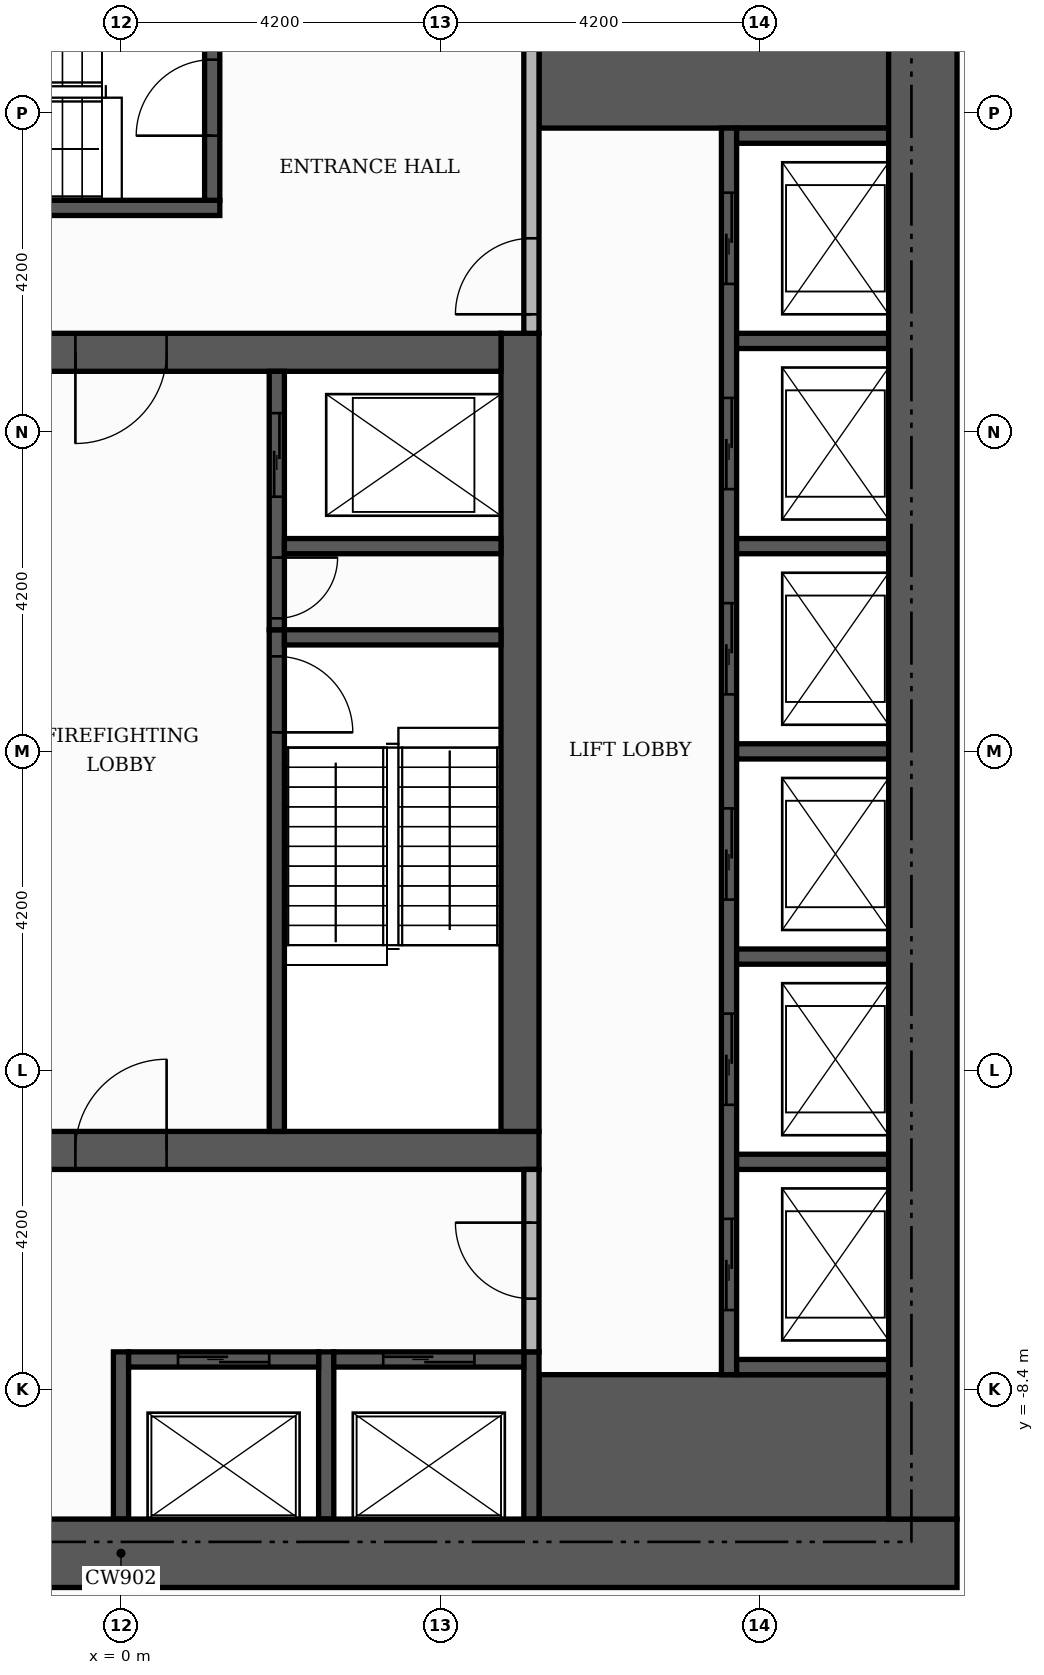
"""IFC4 building model, lengths in metres.
Left out: names, types, materials, properties, quantities, classifications, styles, units other than length and angle.
Written with IfcOpenShell. Run it as: python <this file> out.ifc"""

import sys

from ifc_helpers import new_model, si_unit, direction, frame, frame_2d, origin, place, context, subcontext, project, spatial, rectangle, extrude, element, fill, save


model = new_model("IFC4")
c1 = context("Model", 3, precision=1e-05, world=origin(), true_north=direction((0.0, 1.0)))
c2 = subcontext(c1, "Body", "Model", "MODEL_VIEW")
j1 = project(units=[si_unit("LENGTHUNIT", "METRE"), si_unit("PLANEANGLEUNIT", "RADIAN")], contexts=[c1])
p1 = place(None, origin())
s1 = spatial("IfcSite", under=j1, at=p1, CompositionType="ELEMENT")
p2 = place(p1, origin())
s2 = spatial("IfcBuilding", under=s1, at=p2, CompositionType="ELEMENT")
p3 = place(p2, frame((0.0, 0.0, 126.0)))
s3 = spatial("IfcBuildingStorey", under=s2, at=p3, CompositionType="ELEMENT", Elevation=126.0)
p4 = place(p3, frame((-5.5, -5.25, 0.0), z_axis=(0.0, 0.0, 1.0), x_axis=(1.0, 0.0, 0.0)))
e1 = element("IfcWall", 1, at=p4, inside=s3, PredefinedType="SHEAR", context=c2, shape_type="SweptSolid", body=[
    extrude(rectangle(XDim=11.0, YDim=0.5, at=frame_2d((5.5, 0.0))), origin(), (0.0, 0.0, 1.0), 7.38),
])
p5 = place(p4, frame((4.9, 0.0, 0.0)))
e2 = element("IfcOpeningElement", 2, at=p5, cuts=e1, PredefinedType="OPENING", context=c2, shape_type="SweptSolid", body=[
    extrude(rectangle(XDim=1.2, YDim=2.1, at=frame_2d((0.6, 1.05))), frame((0.0, 0.26, 0.0), z_axis=(0.0, -1.0, 0.0), x_axis=(1.0, 0.0, 0.0)), (0.0, 0.0, 1.0), 0.52),
])
p6 = place(p3, frame((5.25, -5.0, 0.0), z_axis=(0.0, 0.0, 1.0), x_axis=(0.0, 1.0, 0.0)))
e3 = element("IfcWall", 3, at=p6, inside=s3, PredefinedType="SHEAR", context=c2, shape_type="SweptSolid", body=[
    extrude(rectangle(XDim=10.5, YDim=0.5, at=frame_2d((5.25, 0.0))), origin(), (0.0, 0.0, 1.0), 7.38),
])
p7 = place(p3, frame((-5.0, 5.25, 0.0), z_axis=(0.0, 0.0, 1.0), x_axis=(1.0, 0.0, 0.0)))
e4 = element("IfcWall", 4, at=p7, inside=s3, PredefinedType="SHEAR", context=c2, shape_type="SweptSolid", body=[
    extrude(rectangle(XDim=10.0, YDim=0.5, at=frame_2d((5.0, 0.0))), origin(), (0.0, 0.0, 1.0), 7.38),
])
p8 = place(p7, frame((4.4, 0.0, 0.0)))
e5 = element("IfcOpeningElement", 5, at=p8, cuts=e4, PredefinedType="OPENING", context=c2, shape_type="SweptSolid", body=[
    extrude(rectangle(XDim=1.2, YDim=2.1, at=frame_2d((0.6, 1.05))), frame((0.0, 0.26, 0.0), z_axis=(0.0, -1.0, 0.0), x_axis=(1.0, 0.0, 0.0)), (0.0, 0.0, 1.0), 0.52),
])
for number, where, z_axis, x_axis in (
    (6, (5.5, -9.15, 0.0), (0.0, 0.0, 1.0), (1.0, 0.0, 0.0)),
    (7, (5.5, 9.15, 0.0), (0.0, 0.0, 1.0), (1.0, 0.0, 0.0)),
):
    element("IfcWall", number, at=place(p3, frame(where, z_axis=z_axis, x_axis=x_axis)), inside=s3, PredefinedType="SHEAR", context=c2, shape_type="SweptSolid", body=[
        extrude(rectangle(XDim=4.6, YDim=1.9, at=frame_2d((2.3, 0.0))), origin(), (0.0, 0.0, 1.0), 7.38),
    ])
p9 = place(p3, frame((2.05, -5.0, 0.0), z_axis=(0.0, 0.0, 1.0), x_axis=(0.0, 1.0, 0.0)))
e8 = element("IfcWall", 8, at=p9, inside=s3, PredefinedType="SHEAR", context=c2, shape_type="SweptSolid", body=[
    extrude(rectangle(XDim=6.6, YDim=0.2, at=frame_2d((3.3, 0.0))), origin(), (0.0, 0.0, 1.0), 7.38),
])
p10 = place(p9, frame((5.25, 0.0, 0.0)))
e9 = element("IfcOpeningElement", 9, at=p10, cuts=e8, PredefinedType="OPENING", context=c2, shape_type="SweptSolid", body=[
    extrude(rectangle(XDim=1.0, YDim=2.1, at=frame_2d((0.5, 1.05))), frame((0.0, 0.11, 0.0), z_axis=(0.0, -1.0, 0.0), x_axis=(1.0, 0.0, 0.0)), (0.0, 0.0, 1.0), 0.22),
])
p11 = place(p3, frame((2.15, 1.5, 0.0), z_axis=(0.0, 0.0, 1.0), x_axis=(1.0, 0.0, 0.0)))
e10 = element("IfcWall", 10, at=p11, inside=s3, PredefinedType="SHEAR", context=c2, shape_type="SweptSolid", body=[
    extrude(rectangle(XDim=2.85, YDim=0.2, at=frame_2d((1.425, 0.0))), origin(), (0.0, 0.0, 1.0), 7.38),
])
p12 = place(p3, frame((-5.5, 7.15, 0.0), z_axis=(0.0, 0.0, 1.0), x_axis=(1.0, 0.0, 0.0)))
e11 = element("IfcWall", 11, at=p12, inside=s3, PredefinedType="SHEAR", context=c2, shape_type="SweptSolid", body=[
    extrude(rectangle(XDim=6.8, YDim=0.2, at=frame_2d((3.4, 0.0))), origin(), (0.0, 0.0, 1.0), 7.38),
])
p13 = place(p3, frame((1.2, 7.25, 0.0), z_axis=(0.0, 0.0, 1.0), x_axis=(0.0, 1.0, 0.0)))
e12 = element("IfcWall", 12, at=p13, inside=s3, PredefinedType="SHEAR", context=c2, shape_type="SweptSolid", body=[
    extrude(rectangle(XDim=2.85, YDim=0.2, at=frame_2d((1.425, 0.0))), origin(), (0.0, 0.0, 1.0), 7.38),
])
p14 = place(p13, frame((0.85, 0.0, 0.0)))
e13 = element("IfcOpeningElement", 13, at=p14, cuts=e12, PredefinedType="OPENING", context=c2, shape_type="SweptSolid", body=[
    extrude(rectangle(XDim=1.0, YDim=2.1, at=frame_2d((0.5, 1.05))), frame((0.0, 0.11, 0.0), z_axis=(0.0, -1.0, 0.0), x_axis=(1.0, 0.0, 0.0)), (0.0, 0.0, 1.0), 0.22),
])
for number, where, z_axis, x_axis in (
    (14, (0.0, -10.1, 0.0), (0.0, 0.0, 1.0), (0.0, 1.0, 0.0)),
    (15, (2.7, -10.1, 0.0), (0.0, 0.0, 1.0), (0.0, 1.0, 0.0)),
    (16, (5.4, -10.1, 0.0), (0.0, 0.0, 1.0), (0.0, 1.0, 0.0)),
):
    element("IfcWall", number, at=place(p3, frame(where, z_axis=z_axis, x_axis=x_axis)), inside=s3, PredefinedType="SHEAR", context=c2, shape_type="SweptSolid", body=[
        extrude(rectangle(XDim=2.2, YDim=0.2, at=frame_2d((1.1, 0.0))), origin(), (0.0, 0.0, 1.0), 7.38),
    ])
p15 = place(p3, frame((8.0, -8.2, 0.0), z_axis=(0.0, 0.0, 1.0), x_axis=(0.0, 1.0, 0.0)))
e17 = element("IfcWall", 17, at=p15, inside=s3, PredefinedType="SHEAR", context=c2, shape_type="SweptSolid", body=[
    extrude(rectangle(XDim=16.4, YDim=0.2, at=frame_2d((8.2, 0.0))), origin(), (0.0, 0.0, 1.0), 7.38),
])
p16 = place(p15, frame((0.85, 0.0, 0.0)))
e18 = element("IfcOpeningElement", 18, at=p16, cuts=e17, PredefinedType="OPENING", context=c2, shape_type="SweptSolid", body=[
    extrude(rectangle(XDim=1.2, YDim=2.1, at=frame_2d((0.6, 1.05))), frame((0.0, 0.11, 0.0), z_axis=(0.0, -1.0, 0.0), x_axis=(1.0, 0.0, 0.0)), (0.0, 0.0, 1.0), 0.22),
])
p17 = place(p15, frame((3.55, 0.0, 0.0)))
e19 = element("IfcOpeningElement", 19, at=p17, cuts=e17, PredefinedType="OPENING", context=c2, shape_type="SweptSolid", body=[
    extrude(rectangle(XDim=1.2, YDim=2.1, at=frame_2d((0.6, 1.05))), frame((0.0, 0.11, 0.0), z_axis=(0.0, -1.0, 0.0), x_axis=(1.0, 0.0, 0.0)), (0.0, 0.0, 1.0), 0.22),
])
p18 = place(p15, frame((6.25, 0.0, 0.0)))
e20 = element("IfcOpeningElement", 20, at=p18, cuts=e17, PredefinedType="OPENING", context=c2, shape_type="SweptSolid", body=[
    extrude(rectangle(XDim=1.2, YDim=2.1, at=frame_2d((0.6, 1.05))), frame((0.0, 0.11, 0.0), z_axis=(0.0, -1.0, 0.0), x_axis=(1.0, 0.0, 0.0)), (0.0, 0.0, 1.0), 0.22),
])
p19 = place(p15, frame((8.95, 0.0, 0.0)))
e21 = element("IfcOpeningElement", 21, at=p19, cuts=e17, PredefinedType="OPENING", context=c2, shape_type="SweptSolid", body=[
    extrude(rectangle(XDim=1.2, YDim=2.1, at=frame_2d((0.6, 1.05))), frame((0.0, 0.11, 0.0), z_axis=(0.0, -1.0, 0.0), x_axis=(1.0, 0.0, 0.0)), (0.0, 0.0, 1.0), 0.22),
])
p20 = place(p15, frame((11.65, 0.0, 0.0)))
e22 = element("IfcOpeningElement", 22, at=p20, cuts=e17, PredefinedType="OPENING", context=c2, shape_type="SweptSolid", body=[
    extrude(rectangle(XDim=1.2, YDim=2.1, at=frame_2d((0.6, 1.05))), frame((0.0, 0.11, 0.0), z_axis=(0.0, -1.0, 0.0), x_axis=(1.0, 0.0, 0.0)), (0.0, 0.0, 1.0), 0.22),
])
p21 = place(p15, frame((14.35, 0.0, 0.0)))
e23 = element("IfcOpeningElement", 23, at=p21, cuts=e17, PredefinedType="OPENING", context=c2, shape_type="SweptSolid", body=[
    extrude(rectangle(XDim=1.2, YDim=2.1, at=frame_2d((0.6, 1.05))), frame((0.0, 0.11, 0.0), z_axis=(0.0, -1.0, 0.0), x_axis=(1.0, 0.0, 0.0)), (0.0, 0.0, 1.0), 0.22),
])
p22 = place(p3, frame((8.1, -8.1, 0.0), z_axis=(0.0, 0.0, 1.0), x_axis=(1.0, 0.0, 0.0)))
e24 = element("IfcWall", 24, at=p22, inside=s3, PredefinedType="SHEAR", context=c2, shape_type="SweptSolid", body=[
    extrude(rectangle(XDim=2.0, YDim=0.2, at=frame_2d((1.0, 0.0))), origin(), (0.0, 0.0, 1.0), 7.38),
])
p23 = place(p3, frame((0.1, -8.0, 0.0), z_axis=(0.0, 0.0, 1.0), x_axis=(1.0, 0.0, 0.0)))
e25 = element("IfcWall", 25, at=p23, inside=s3, PredefinedType="SHEAR", context=c2, shape_type="SweptSolid", body=[
    extrude(rectangle(XDim=2.5, YDim=0.2, at=frame_2d((1.25, 0.0))), origin(), (0.0, 0.0, 1.0), 7.38),
])
p24 = place(p23, frame((0.65, 0.0, 0.0)))
e26 = element("IfcOpeningElement", 26, at=p24, cuts=e25, PredefinedType="OPENING", context=c2, shape_type="SweptSolid", body=[
    extrude(rectangle(XDim=1.2, YDim=2.1, at=frame_2d((0.6, 1.05))), frame((0.0, 0.11, 0.0), z_axis=(0.0, -1.0, 0.0), x_axis=(1.0, 0.0, 0.0)), (0.0, 0.0, 1.0), 0.22),
])
p25 = place(p3, frame((2.8, -8.0, 0.0), z_axis=(0.0, 0.0, 1.0), x_axis=(1.0, 0.0, 0.0)))
e27 = element("IfcWall", 27, at=p25, inside=s3, PredefinedType="SHEAR", context=c2, shape_type="SweptSolid", body=[
    extrude(rectangle(XDim=2.5, YDim=0.2, at=frame_2d((1.25, 0.0))), origin(), (0.0, 0.0, 1.0), 7.38),
])
p26 = place(p25, frame((0.65, 0.0, 0.0)))
e28 = element("IfcOpeningElement", 28, at=p26, cuts=e27, PredefinedType="OPENING", context=c2, shape_type="SweptSolid", body=[
    extrude(rectangle(XDim=1.2, YDim=2.1, at=frame_2d((0.6, 1.05))), frame((0.0, 0.11, 0.0), z_axis=(0.0, -1.0, 0.0), x_axis=(1.0, 0.0, 0.0)), (0.0, 0.0, 1.0), 0.22),
])
for number, where, z_axis, x_axis in (
    (29, (8.1, -5.4, 0.0), (0.0, 0.0, 1.0), (1.0, 0.0, 0.0)),
    (30, (8.1, -2.7, 0.0), (0.0, 0.0, 1.0), (1.0, 0.0, 0.0)),
    (31, (8.1, 0.0, 0.0), (0.0, 0.0, 1.0), (1.0, 0.0, 0.0)),
):
    element("IfcWall", number, at=place(p3, frame(where, z_axis=z_axis, x_axis=x_axis)), inside=s3, PredefinedType="SHEAR", context=c2, shape_type="SweptSolid", body=[
        extrude(rectangle(XDim=2.0, YDim=0.2, at=frame_2d((1.0, 0.0))), origin(), (0.0, 0.0, 1.0), 7.38),
    ])
p27 = place(p3, frame((2.05, 1.6, 0.0), z_axis=(0.0, 0.0, 1.0), x_axis=(0.0, 1.0, 0.0)))
e32 = element("IfcWall", 32, at=p27, inside=s3, PredefinedType="SHEAR", context=c2, shape_type="SweptSolid", body=[
    extrude(rectangle(XDim=3.4, YDim=0.2, at=frame_2d((1.7, 0.0))), origin(), (0.0, 0.0, 1.0), 7.38),
])
p28 = place(p27, frame((1.75, 0.0, 0.0)))
e33 = element("IfcOpeningElement", 33, at=p28, cuts=e32, PredefinedType="OPENING", context=c2, shape_type="SweptSolid", body=[
    extrude(rectangle(XDim=1.1, YDim=2.1, at=frame_2d((0.55, 1.05))), frame((0.0, 0.11, 0.0), z_axis=(0.0, -1.0, 0.0), x_axis=(1.0, 0.0, 0.0)), (0.0, 0.0, 1.0), 0.22),
])
p29 = place(p27, frame((0.15, 0.0, 0.0)))
e34 = element("IfcOpeningElement", 34, at=p29, cuts=e32, PredefinedType="OPENING", context=c2, shape_type="SweptSolid", body=[
    extrude(rectangle(XDim=0.8, YDim=2.1, at=frame_2d((0.4, 1.05))), frame((0.0, 0.11, 0.0), z_axis=(0.0, -1.0, 0.0), x_axis=(1.0, 0.0, 0.0)), (0.0, 0.0, 1.0), 0.22),
])
p30 = place(p3, frame((2.15, 2.7, 0.0), z_axis=(0.0, 0.0, 1.0), x_axis=(1.0, 0.0, 0.0)))
e35 = element("IfcWall", 35, at=p30, inside=s3, PredefinedType="SHEAR", context=c2, shape_type="SweptSolid", body=[
    extrude(rectangle(XDim=2.85, YDim=0.2, at=frame_2d((1.425, 0.0))), origin(), (0.0, 0.0, 1.0), 7.38),
])
for number, where, z_axis, x_axis in (
    (36, (8.1, 2.7, 0.0), (0.0, 0.0, 1.0), (1.0, 0.0, 0.0)),
    (37, (8.1, 5.4, 0.0), (0.0, 0.0, 1.0), (1.0, 0.0, 0.0)),
    (38, (8.1, 8.1, 0.0), (0.0, 0.0, 1.0), (1.0, 0.0, 0.0)),
):
    element("IfcWall", number, at=place(p3, frame(where, z_axis=z_axis, x_axis=x_axis)), inside=s3, PredefinedType="SHEAR", context=c2, shape_type="SweptSolid", body=[
        extrude(rectangle(XDim=2.0, YDim=0.2, at=frame_2d((1.0, 0.0))), origin(), (0.0, 0.0, 1.0), 7.38),
    ])
p31 = place(p3, frame((-11.0, -10.55, 0.0), z_axis=(0.0, 0.0, 1.0), x_axis=(1.0, 0.0, 0.0)))
e39 = element("IfcWall", 39, at=p31, inside=s3, PredefinedType="SHEAR", context=c2, shape_type="SweptSolid", body=[
    extrude(rectangle(XDim=22.0, YDim=0.9, at=frame_2d((11.0, 0.0))), origin(), (0.0, 0.0, 1.0), 7.38),
])
p32 = place(p31, frame((7.4, 0.0, 0.0)))
e40 = element("IfcOpeningElement", 40, at=p32, cuts=e39, PredefinedType="OPENING", context=c2, shape_type="SweptSolid", body=[
    extrude(rectangle(XDim=1.8, YDim=2.2, at=frame_2d((0.9, 1.1))), frame((0.0, 0.46, 0.0), z_axis=(0.0, -1.0, 0.0), x_axis=(1.0, 0.0, 0.0)), (0.0, 0.0, 1.0), 0.92),
])
p33 = place(p3, frame((10.55, -10.1, 0.0), z_axis=(0.0, 0.0, 1.0), x_axis=(0.0, 1.0, 0.0)))
e41 = element("IfcWall", 41, at=p33, inside=s3, PredefinedType="SHEAR", context=c2, shape_type="SweptSolid", body=[
    extrude(rectangle(XDim=20.2, YDim=0.9, at=frame_2d((10.1, 0.0))), origin(), (0.0, 0.0, 1.0), 7.38),
])
p34 = place(p3, frame((5.4, -7.9, 0.0), z_axis=(0.0, 0.0, 1.0), x_axis=(0.0, 1.0, 0.0)))
e42 = element("IfcWall", 42, at=p34, inside=s3, PredefinedType="PARTITIONING", context=c2, shape_type="SweptSolid", body=[
    extrude(rectangle(XDim=2.4, YDim=0.2, at=frame_2d((1.2, 0.0))), origin(), (0.0, 0.0, 1.0), 7.38),
])
p35 = place(p34, frame((0.7, 0.0, 0.0)))
e43 = element("IfcOpeningElement", 43, at=p35, cuts=e42, PredefinedType="OPENING", context=c2, shape_type="SweptSolid", body=[
    extrude(rectangle(XDim=1.0, YDim=2.1, at=frame_2d((0.5, 1.05))), frame((0.0, 0.11, 0.0), z_axis=(0.0, -1.0, 0.0), x_axis=(1.0, 0.0, 0.0)), (0.0, 0.0, 1.0), 0.22),
])
p36 = place(p3, frame((5.4, 5.5, 0.0), z_axis=(0.0, 0.0, 1.0), x_axis=(0.0, 1.0, 0.0)))
e44 = element("IfcWall", 44, at=p36, inside=s3, PredefinedType="PARTITIONING", context=c2, shape_type="SweptSolid", body=[
    extrude(rectangle(XDim=4.6, YDim=0.2, at=frame_2d((2.3, 0.0))), origin(), (0.0, 0.0, 1.0), 7.38),
])
p37 = place(p36, frame((0.25, 0.0, 0.0)))
e45 = element("IfcOpeningElement", 45, at=p37, cuts=e44, PredefinedType="OPENING", context=c2, shape_type="SweptSolid", body=[
    extrude(rectangle(XDim=1.0, YDim=2.1, at=frame_2d((0.5, 1.05))), frame((0.0, 0.11, 0.0), z_axis=(0.0, -1.0, 0.0), x_axis=(1.0, 0.0, 0.0)), (0.0, 0.0, 1.0), 0.22),
])
p38 = place(p16, origin())
e46 = element("IfcDoor", 46, at=p38, inside=s3, OperationType="SLIDING_TO_LEFT", PredefinedType="DOOR", context=c2, shape_type="SweptSolid", body=[
    extrude(rectangle(XDim=1.2, YDim=2.1, at=frame_2d((0.6, 1.05))), frame((0.0, 0.025, 0.0), z_axis=(0.0, -1.0, 0.0), x_axis=(1.0, 0.0, 0.0)), (0.0, 0.0, 1.0), 0.05),
])
fill(e18, e46)
p39 = place(p17, origin())
e47 = element("IfcDoor", 47, at=p39, inside=s3, OperationType="SLIDING_TO_LEFT", PredefinedType="DOOR", context=c2, shape_type="SweptSolid", body=[
    extrude(rectangle(XDim=1.2, YDim=2.1, at=frame_2d((0.6, 1.05))), frame((0.0, 0.025, 0.0), z_axis=(0.0, -1.0, 0.0), x_axis=(1.0, 0.0, 0.0)), (0.0, 0.0, 1.0), 0.05),
])
fill(e19, e47)
p40 = place(p18, origin())
e48 = element("IfcDoor", 48, at=p40, inside=s3, OperationType="SLIDING_TO_LEFT", PredefinedType="DOOR", context=c2, shape_type="SweptSolid", body=[
    extrude(rectangle(XDim=1.2, YDim=2.1, at=frame_2d((0.6, 1.05))), frame((0.0, 0.025, 0.0), z_axis=(0.0, -1.0, 0.0), x_axis=(1.0, 0.0, 0.0)), (0.0, 0.0, 1.0), 0.05),
])
fill(e20, e48)
p41 = place(p19, origin())
e49 = element("IfcDoor", 49, at=p41, inside=s3, OperationType="SLIDING_TO_LEFT", PredefinedType="DOOR", context=c2, shape_type="SweptSolid", body=[
    extrude(rectangle(XDim=1.2, YDim=2.1, at=frame_2d((0.6, 1.05))), frame((0.0, 0.025, 0.0), z_axis=(0.0, -1.0, 0.0), x_axis=(1.0, 0.0, 0.0)), (0.0, 0.0, 1.0), 0.05),
])
fill(e21, e49)
p42 = place(p20, origin())
e50 = element("IfcDoor", 50, at=p42, inside=s3, OperationType="SLIDING_TO_LEFT", PredefinedType="DOOR", context=c2, shape_type="SweptSolid", body=[
    extrude(rectangle(XDim=1.2, YDim=2.1, at=frame_2d((0.6, 1.05))), frame((0.0, 0.025, 0.0), z_axis=(0.0, -1.0, 0.0), x_axis=(1.0, 0.0, 0.0)), (0.0, 0.0, 1.0), 0.05),
])
fill(e22, e50)
p43 = place(p21, origin())
e51 = element("IfcDoor", 51, at=p43, inside=s3, OperationType="SLIDING_TO_LEFT", PredefinedType="DOOR", context=c2, shape_type="SweptSolid", body=[
    extrude(rectangle(XDim=1.2, YDim=2.1, at=frame_2d((0.6, 1.05))), frame((0.0, 0.025, 0.0), z_axis=(0.0, -1.0, 0.0), x_axis=(1.0, 0.0, 0.0)), (0.0, 0.0, 1.0), 0.05),
])
fill(e23, e51)
p44 = place(p24, origin())
e52 = element("IfcDoor", 52, at=p44, inside=s3, OperationType="SLIDING_TO_LEFT", PredefinedType="DOOR", context=c2, shape_type="SweptSolid", body=[
    extrude(rectangle(XDim=1.2, YDim=2.1, at=frame_2d((0.6, 1.05))), frame((0.0, 0.025, 0.0), z_axis=(0.0, -1.0, 0.0), x_axis=(1.0, 0.0, 0.0)), (0.0, 0.0, 1.0), 0.05),
])
fill(e26, e52)
p45 = place(p26, origin())
e53 = element("IfcDoor", 53, at=p45, inside=s3, OperationType="SLIDING_TO_LEFT", PredefinedType="DOOR", context=c2, shape_type="SweptSolid", body=[
    extrude(rectangle(XDim=1.2, YDim=2.1, at=frame_2d((0.6, 1.05))), frame((0.0, 0.025, 0.0), z_axis=(0.0, -1.0, 0.0), x_axis=(1.0, 0.0, 0.0)), (0.0, 0.0, 1.0), 0.05),
])
fill(e28, e53)
p46 = place(p28, origin())
e54 = element("IfcDoor", 54, at=p46, inside=s3, OperationType="SLIDING_TO_LEFT", PredefinedType="DOOR", context=c2, shape_type="SweptSolid", body=[
    extrude(rectangle(XDim=1.1, YDim=2.1, at=frame_2d((0.55, 1.05))), frame((0.0, 0.025, 0.0), z_axis=(0.0, -1.0, 0.0), x_axis=(1.0, 0.0, 0.0)), (0.0, 0.0, 1.0), 0.05),
])
fill(e33, e54)
p47 = place(p10, frame((1.0, 0.0, 0.0), z_axis=(0.0, 0.0, 1.0), x_axis=(-1.0, 0.0, 0.0)))
e55 = element("IfcDoor", 55, at=p47, inside=s3, OperationType="SINGLE_SWING_LEFT", PredefinedType="DOOR", context=c2, shape_type="SweptSolid", body=[
    extrude(rectangle(XDim=1.0, YDim=2.1, at=frame_2d((0.5, 1.05))), frame((0.0, 0.025, 0.0), z_axis=(0.0, -1.0, 0.0), x_axis=(1.0, 0.0, 0.0)), (0.0, 0.0, 1.0), 0.05),
])
fill(e9, e55)
p48 = place(p29, frame((0.8, 0.0, 0.0), z_axis=(0.0, 0.0, 1.0), x_axis=(-1.0, 0.0, 0.0)))
e56 = element("IfcDoor", 56, at=p48, inside=s3, OperationType="SINGLE_SWING_RIGHT", PredefinedType="DOOR", context=c2, shape_type="SweptSolid", body=[
    extrude(rectangle(XDim=0.8, YDim=2.1, at=frame_2d((0.4, 1.05))), frame((0.0, 0.025, 0.0), z_axis=(0.0, -1.0, 0.0), x_axis=(1.0, 0.0, 0.0)), (0.0, 0.0, 1.0), 0.05),
])
fill(e34, e56)
p49 = place(p8, frame((1.2, 0.0, 0.0), z_axis=(0.0, 0.0, 1.0), x_axis=(-1.0, 0.0, 0.0)))
e57 = element("IfcDoor", 57, at=p49, inside=s3, OperationType="SINGLE_SWING_LEFT", PredefinedType="DOOR", context=c2, shape_type="SweptSolid", body=[
    extrude(rectangle(XDim=1.2, YDim=2.1, at=frame_2d((0.6, 1.05))), frame((0.0, 0.025, 0.0), z_axis=(0.0, -1.0, 0.0), x_axis=(1.0, 0.0, 0.0)), (0.0, 0.0, 1.0), 0.05),
])
fill(e5, e57)
p50 = place(p5, origin())
e58 = element("IfcDoor", 58, at=p50, inside=s3, OperationType="SINGLE_SWING_RIGHT", PredefinedType="DOOR", context=c2, shape_type="SweptSolid", body=[
    extrude(rectangle(XDim=1.2, YDim=2.1, at=frame_2d((0.6, 1.05))), frame((0.0, 0.025, 0.0), z_axis=(0.0, -1.0, 0.0), x_axis=(1.0, 0.0, 0.0)), (0.0, 0.0, 1.0), 0.05),
])
fill(e2, e58)
p51 = place(p14, origin())
e59 = element("IfcDoor", 59, at=p51, inside=s3, OperationType="SINGLE_SWING_LEFT", PredefinedType="DOOR", context=c2, shape_type="SweptSolid", body=[
    extrude(rectangle(XDim=1.0, YDim=2.1, at=frame_2d((0.5, 1.05))), frame((0.0, 0.025, 0.0), z_axis=(0.0, -1.0, 0.0), x_axis=(1.0, 0.0, 0.0)), (0.0, 0.0, 1.0), 0.05),
])
fill(e13, e59)
p52 = place(p37, origin())
e60 = element("IfcDoor", 60, at=p52, inside=s3, OperationType="SINGLE_SWING_LEFT", PredefinedType="DOOR", context=c2, shape_type="SweptSolid", body=[
    extrude(rectangle(XDim=1.0, YDim=2.1, at=frame_2d((0.5, 1.05))), frame((0.0, 0.025, 0.0), z_axis=(0.0, -1.0, 0.0), x_axis=(1.0, 0.0, 0.0)), (0.0, 0.0, 1.0), 0.05),
])
fill(e45, e60)
p53 = place(p35, origin())
e61 = element("IfcDoor", 61, at=p53, inside=s3, OperationType="SINGLE_SWING_RIGHT", PredefinedType="DOOR", context=c2, shape_type="SweptSolid", body=[
    extrude(rectangle(XDim=1.0, YDim=2.1, at=frame_2d((0.5, 1.05))), frame((0.0, 0.025, 0.0), z_axis=(0.0, -1.0, 0.0), x_axis=(1.0, 0.0, 0.0)), (0.0, 0.0, 1.0), 0.05),
])
fill(e43, e61)
save(model, sys.argv[1])
